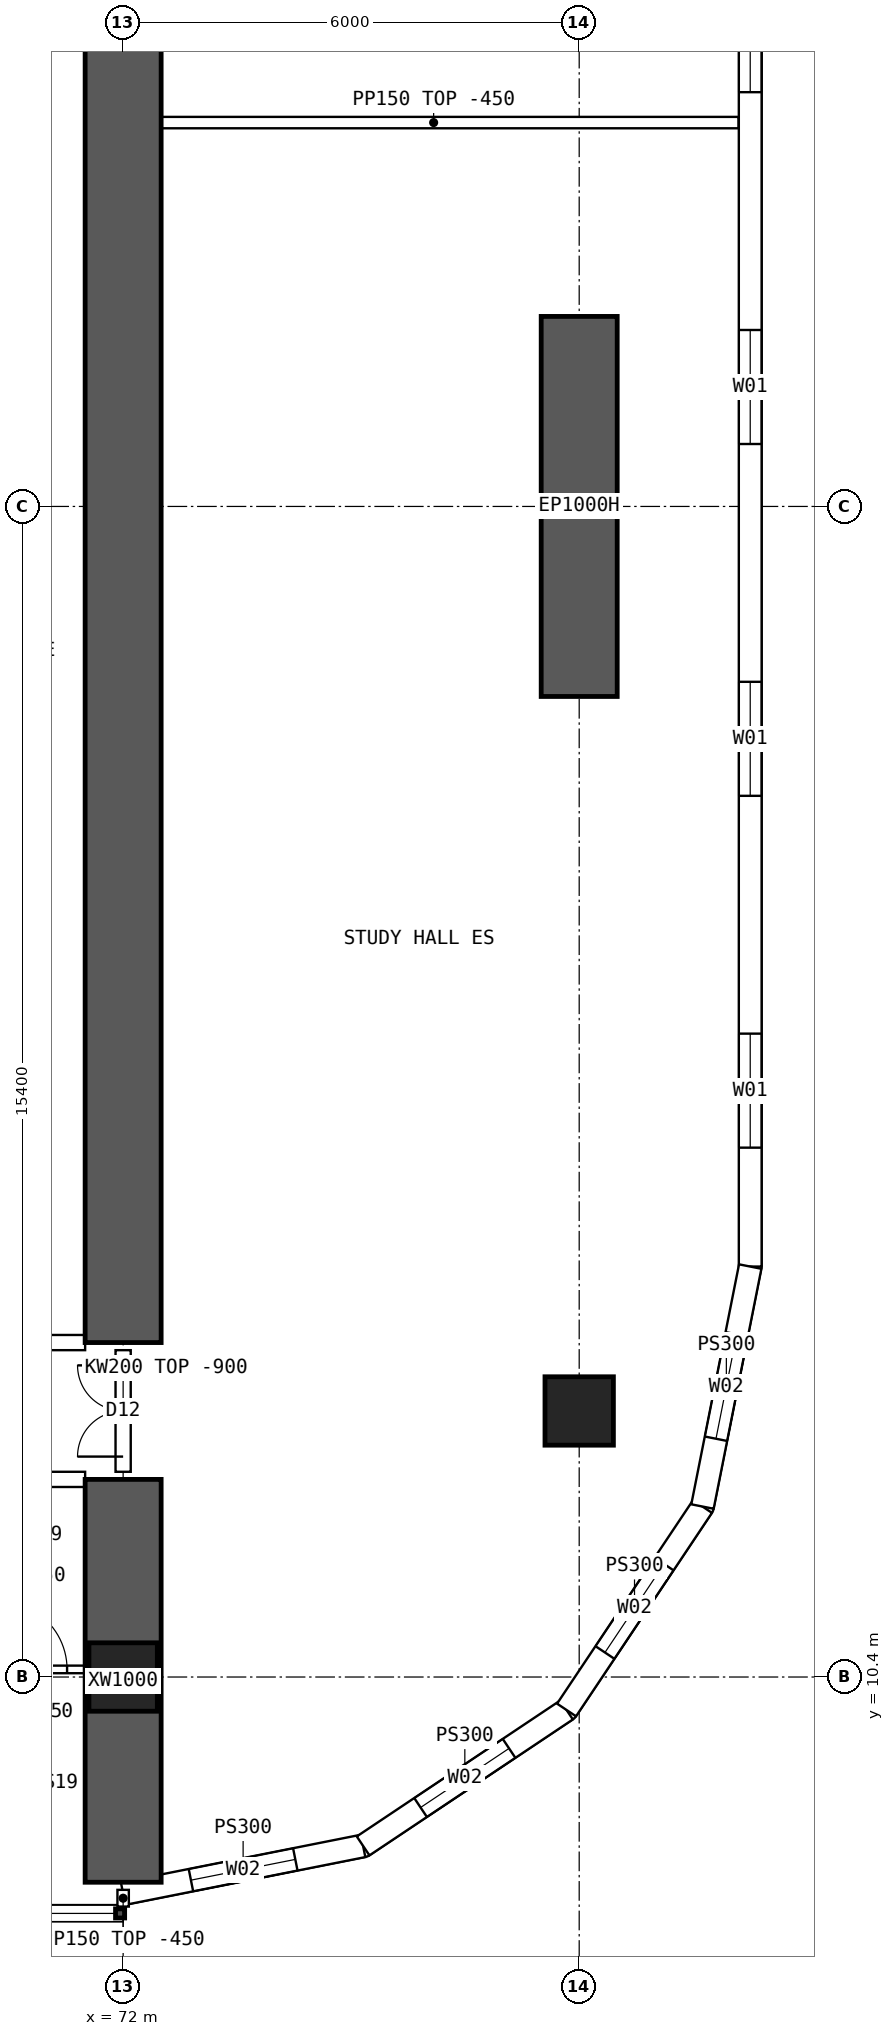
"""IFC4 building model, lengths in metres.
Left out: names, types, materials, properties, quantities, classifications, styles, units other than length and angle.
Written with IfcOpenShell. Run it as: python <this file> out.ifc"""

import sys

from ifc_helpers import new_model, si_unit, direction, frame, frame_2d, origin, origin_2d, place, context, subcontext, project, spatial, polyline, rectangle, hollow_rectangle, outline, extrude, element, fill, save


model = new_model("IFC4")
c1 = context("Model", 3, precision=1e-05, world=origin(), true_north=direction((0.0, 1.0)))
c2 = subcontext(c1, "Body", "Model", "MODEL_VIEW")
j1 = project(units=[si_unit("LENGTHUNIT", "METRE"), si_unit("PLANEANGLEUNIT", "RADIAN")], contexts=[c1])
p1 = place(None, origin())
s1 = spatial("IfcSite", under=j1, at=p1, CompositionType="ELEMENT")
p2 = place(p1, origin())
s2 = spatial("IfcBuilding", under=s1, at=p2, CompositionType="ELEMENT")
p3 = place(p2, frame((0.0, 0.0, 20.2)))
s3 = spatial("IfcBuildingStorey", under=s2, at=p3, CompositionType="ELEMENT", Elevation=20.2)
for number, where, z_axis, x_axis in (
    (1, (72.0, 10.4, 0.0), (0.0, 0.0, 1.0), (1.0, 0.0, 0.0)),
    (2, (78.0, 13.9, 0.0), (0.0, 0.0, 1.0), (1.0, 0.0, 0.0)),
):
    element("IfcColumn", number, at=place(p3, frame(where, z_axis=z_axis, x_axis=x_axis)), inside=s3, PredefinedType="COLUMN", context=c2, shape_type="SweptSolid", body=[
        extrude(hollow_rectangle(XDim=0.9, YDim=0.9, WallThickness=0.09, at=origin_2d()), origin(), (0.0, 0.0, 1.0), 3.75),
    ])
p4 = place(p3, frame((78.0, 23.3, 0.0), z_axis=(0.0, 0.0, 1.0), x_axis=(0.0, 1.0, 0.0)))
e3 = element("IfcWall", 3, at=p4, inside=s3, PredefinedType="SHEAR", context=c2, shape_type="SweptSolid", body=[
    extrude(rectangle(XDim=5.0, YDim=1.0, at=frame_2d((2.5, 0.0))), origin(), (0.0, 0.0, 1.0), 3.75),
])
p5 = place(p3, frame((72.0, 7.7, 0.0), z_axis=(0.0, 0.0, 1.0), x_axis=(0.0, 1.0, 0.0)))
e4 = element("IfcWall", 4, at=p5, inside=s3, PredefinedType="SHEAR", context=c2, shape_type="SweptSolid", body=[
    extrude(rectangle(XDim=5.3, YDim=1.0, at=frame_2d((2.65, 0.0))), origin(), (0.0, 0.0, 1.0), 3.75),
])
p6 = place(p3, frame((72.0, 14.8, 0.0), z_axis=(0.0, 0.0, 1.0), x_axis=(0.0, 1.0, 0.0)))
e5 = element("IfcWall", 5, at=p6, inside=s3, PredefinedType="SHEAR", context=c2, shape_type="SweptSolid", body=[
    extrude(rectangle(XDim=34.4, YDim=1.0, at=frame_2d((17.2, 0.0))), origin(), (0.0, 0.0, 1.0), 3.75),
])
p7 = place(p3, frame((80.25, 15.8, 0.0), z_axis=(0.0, 0.0, 1.0), x_axis=(0.0, 1.0, 0.0)))
e6 = element("IfcWall", 6, at=p7, inside=s3, PredefinedType="SOLIDWALL", context=c2, shape_type="SweptSolid", body=[
    extrude(outline(polyline([(-0.015, -0.15), (32.415, -0.15), (32.385, 0.15), (0.015, 0.15), (-0.015, -0.15)])), origin(), (0.0, 0.0, 1.0), 3.3),
])
p8 = place(p7, frame((1.564, 0.0, 0.9)))
e7 = element("IfcOpeningElement", 7, at=p8, cuts=e6, PredefinedType="OPENING", context=c2, shape_type="SweptSolid", body=[
    extrude(rectangle(XDim=1.5, YDim=2.0, at=frame_2d((0.75, 1.0))), frame((0.0, 0.16, 0.0), z_axis=(0.0, -1.0, 0.0), x_axis=(1.0, 0.0, 0.0)), (0.0, 0.0, 1.0), 0.32),
])
p9 = place(p7, frame((6.193, 0.0, 0.9)))
e8 = element("IfcOpeningElement", 8, at=p9, cuts=e6, PredefinedType="OPENING", context=c2, shape_type="SweptSolid", body=[
    extrude(rectangle(XDim=1.5, YDim=2.0, at=frame_2d((0.75, 1.0))), frame((0.0, 0.16, 0.0), z_axis=(0.0, -1.0, 0.0), x_axis=(1.0, 0.0, 0.0)), (0.0, 0.0, 1.0), 0.32),
])
p10 = place(p7, frame((10.822, 0.0, 0.9)))
e9 = element("IfcOpeningElement", 9, at=p10, cuts=e6, PredefinedType="OPENING", context=c2, shape_type="SweptSolid", body=[
    extrude(rectangle(XDim=1.5, YDim=2.0, at=frame_2d((0.75, 1.0))), frame((0.0, 0.16, 0.0), z_axis=(0.0, -1.0, 0.0), x_axis=(1.0, 0.0, 0.0)), (0.0, 0.0, 1.0), 0.32),
])
p11 = place(p7, frame((15.45, 0.0, 0.9)))
e10 = element("IfcOpeningElement", 10, at=p11, cuts=e6, PredefinedType="OPENING", context=c2, shape_type="SweptSolid", body=[
    extrude(rectangle(XDim=1.5, YDim=2.0, at=frame_2d((0.75, 1.0))), frame((0.0, 0.16, 0.0), z_axis=(0.0, -1.0, 0.0), x_axis=(1.0, 0.0, 0.0)), (0.0, 0.0, 1.0), 0.32),
])
p12 = place(p7, frame((20.079, 0.0, 0.9)))
e11 = element("IfcOpeningElement", 11, at=p12, cuts=e6, PredefinedType="OPENING", context=c2, shape_type="SweptSolid", body=[
    extrude(rectangle(XDim=1.5, YDim=2.0, at=frame_2d((0.75, 1.0))), frame((0.0, 0.16, 0.0), z_axis=(0.0, -1.0, 0.0), x_axis=(1.0, 0.0, 0.0)), (0.0, 0.0, 1.0), 0.32),
])
p13 = place(p7, frame((24.707, 0.0, 0.9)))
e12 = element("IfcOpeningElement", 12, at=p13, cuts=e6, PredefinedType="OPENING", context=c2, shape_type="SweptSolid", body=[
    extrude(rectangle(XDim=1.5, YDim=2.0, at=frame_2d((0.75, 1.0))), frame((0.0, 0.16, 0.0), z_axis=(0.0, -1.0, 0.0), x_axis=(1.0, 0.0, 0.0)), (0.0, 0.0, 1.0), 0.32),
])
p14 = place(p7, frame((29.336, 0.0, 0.9)))
e13 = element("IfcOpeningElement", 13, at=p14, cuts=e6, PredefinedType="OPENING", context=c2, shape_type="SweptSolid", body=[
    extrude(rectangle(XDim=1.5, YDim=2.0, at=frame_2d((0.75, 1.0))), frame((0.0, 0.16, 0.0), z_axis=(0.0, -1.0, 0.0), x_axis=(1.0, 0.0, 0.0)), (0.0, 0.0, 1.0), 0.32),
])
p15 = place(p3, frame((72.0, 7.55, 0.0), z_axis=(0.0, 0.0, 1.0), x_axis=(0.980787251524, 0.195080412259, 0.0)))
e14 = element("IfcWall", 14, at=p15, inside=s3, PredefinedType="SOLIDWALL", context=c2, shape_type="SweptSolid", body=[
    extrude(outline(polyline([(-0.03, -0.15), (3.249, -0.15), (3.189, 0.15), (0.03, 0.15), (-0.03, -0.15)])), origin(), (0.0, 0.0, 1.0), 3.3),
])
p16 = place(p15, frame((0.909, 0.0, 0.9)))
e15 = element("IfcOpeningElement", 15, at=p16, cuts=e14, PredefinedType="OPENING", context=c2, shape_type="SweptSolid", body=[
    extrude(rectangle(XDim=1.4, YDim=1.8, at=frame_2d((0.7, 0.9))), frame((0.0, 0.16, 0.0), z_axis=(0.0, -1.0, 0.0), x_axis=(1.0, 0.0, 0.0)), (0.0, 0.0, 1.0), 0.32),
])
p17 = place(p3, frame((75.157, 8.178, 0.0), z_axis=(0.0, 0.0, 1.0), x_axis=(0.831478105043, 0.555557522525, 0.0)))
e16 = element("IfcWall", 16, at=p17, inside=s3, PredefinedType="SOLIDWALL", context=c2, shape_type="SweptSolid", body=[
    extrude(outline(polyline([(-0.03, -0.15), (3.249, -0.15), (3.189, 0.15), (0.03, 0.15), (-0.03, -0.15)])), origin(), (0.0, 0.0, 1.0), 3.3),
])
p18 = place(p17, frame((0.909, 0.0, 0.9)))
e17 = element("IfcOpeningElement", 17, at=p18, cuts=e16, PredefinedType="OPENING", context=c2, shape_type="SweptSolid", body=[
    extrude(rectangle(XDim=1.4, YDim=1.8, at=frame_2d((0.7, 0.9))), frame((0.0, 0.16, 0.0), z_axis=(0.0, -1.0, 0.0), x_axis=(1.0, 0.0, 0.0)), (0.0, 0.0, 1.0), 0.32),
])
p19 = place(p3, frame((77.833, 9.966, 0.0), z_axis=(0.0, 0.0, 1.0), x_axis=(0.555609954424, 0.831443069936, 0.0)))
e18 = element("IfcWall", 18, at=p19, inside=s3, PredefinedType="SOLIDWALL", context=c2, shape_type="SweptSolid", body=[
    extrude(outline(polyline([(-0.03, -0.15), (3.249, -0.15), (3.189, 0.15), (0.03, 0.15), (-0.03, -0.15)])), origin(), (0.0, 0.0, 1.0), 3.3),
])
p20 = place(p19, frame((0.909, 0.0, 0.9)))
e19 = element("IfcOpeningElement", 19, at=p20, cuts=e18, PredefinedType="OPENING", context=c2, shape_type="SweptSolid", body=[
    extrude(rectangle(XDim=1.4, YDim=1.8, at=frame_2d((0.7, 0.9))), frame((0.0, 0.16, 0.0), z_axis=(0.0, -1.0, 0.0), x_axis=(1.0, 0.0, 0.0)), (0.0, 0.0, 1.0), 0.32),
])
p21 = place(p3, frame((79.622, 12.643, 0.0), z_axis=(0.0, 0.0, 1.0), x_axis=(0.195065901187, 0.980790137692, 0.0)))
e20 = element("IfcWall", 20, at=p21, inside=s3, PredefinedType="SOLIDWALL", context=c2, shape_type="SweptSolid", body=[
    extrude(outline(polyline([(-0.03, -0.15), (3.234, -0.15), (3.204, 0.15), (0.03, 0.15), (-0.03, -0.15)])), origin(), (0.0, 0.0, 1.0), 3.3),
])
p22 = place(p21, frame((0.909, 0.0, 0.9)))
e21 = element("IfcOpeningElement", 21, at=p22, cuts=e20, PredefinedType="OPENING", context=c2, shape_type="SweptSolid", body=[
    extrude(rectangle(XDim=1.4, YDim=1.8, at=frame_2d((0.7, 0.9))), frame((0.0, 0.16, 0.0), z_axis=(0.0, -1.0, 0.0), x_axis=(1.0, 0.0, 0.0)), (0.0, 0.0, 1.0), 0.32),
])
p23 = place(p3, frame((66.5, 13.0, 0.0), z_axis=(0.0, 0.0, 1.0), x_axis=(1.0, 0.0, 0.0)))
e22 = element("IfcWall", 22, at=p23, inside=s3, PredefinedType="SOLIDWALL", context=c2, shape_type="SweptSolid", body=[
    extrude(outline(polyline([(0.0, 0.0), (5.0, 0.0), (5.0, 2.9), (0.0, 2.9), (0.0, 0.0)])), frame((0.0, 0.1, 0.0), z_axis=(0.0, -1.0, 0.0), x_axis=(1.0, 0.0, 0.0)), (0.0, 0.0, 1.0), 0.2),
])
p24 = place(p23, frame((1.425, 0.0, 0.0)))
e23 = element("IfcOpeningElement", 23, at=p24, cuts=e22, PredefinedType="OPENING", context=c2, shape_type="SweptSolid", body=[
    extrude(rectangle(XDim=0.9, YDim=2.1, at=frame_2d((0.45, 1.05))), frame((0.0, 0.11, 0.0), z_axis=(0.0, -1.0, 0.0), x_axis=(1.0, 0.0, 0.0)), (0.0, 0.0, 1.0), 0.22),
])
p25 = place(p23, frame((2.675, 0.0, 0.0)))
e24 = element("IfcOpeningElement", 24, at=p25, cuts=e22, PredefinedType="OPENING", context=c2, shape_type="SweptSolid", body=[
    extrude(rectangle(XDim=0.9, YDim=2.1, at=frame_2d((0.45, 1.05))), frame((0.0, 0.11, 0.0), z_axis=(0.0, -1.0, 0.0), x_axis=(1.0, 0.0, 0.0)), (0.0, 0.0, 1.0), 0.22),
])
p26 = place(p3, frame((66.5, 14.8, 0.0), z_axis=(0.0, 0.0, 1.0), x_axis=(1.0, 0.0, 0.0)))
e25 = element("IfcWall", 25, at=p26, inside=s3, PredefinedType="SOLIDWALL", context=c2, shape_type="SweptSolid", body=[
    extrude(rectangle(XDim=5.0, YDim=0.2, at=frame_2d((2.5, 0.0))), origin(), (0.0, 0.0, 1.0), 3.3),
])
p27 = place(p26, frame((0.2, 0.0, 0.0)))
e26 = element("IfcOpeningElement", 26, at=p27, cuts=e25, PredefinedType="OPENING", context=c2, shape_type="SweptSolid", body=[
    extrude(rectangle(XDim=1.6, YDim=2.1, at=frame_2d((0.8, 1.05))), frame((0.0, 0.11, 0.0), z_axis=(0.0, -1.0, 0.0), x_axis=(1.0, 0.0, 0.0)), (0.0, 0.0, 1.0), 0.22),
])
p28 = place(p3, frame((71.55, 10.5, 0.0), z_axis=(0.0, 0.0, 1.0), x_axis=(-1.0, 0.0, 0.0)))
e27 = element("IfcWall", 27, at=p28, inside=s3, PredefinedType="PARTITIONING", context=c2, shape_type="SweptSolid", body=[
    extrude(outline(polyline([(0.0, 0.0), (1.425, 0.0), (1.425, 2.9), (0.0, 2.9), (0.0, 0.0)])), frame((0.0, 0.05, 0.0), z_axis=(0.0, -1.0, 0.0), x_axis=(1.0, 0.0, 0.0)), (0.0, 0.0, 1.0), 0.1),
])
p29 = place(p28, frame((0.288, 0.0, 0.0)))
e28 = element("IfcOpeningElement", 28, at=p29, cuts=e27, PredefinedType="OPENING", context=c2, shape_type="SweptSolid", body=[
    extrude(rectangle(XDim=0.9, YDim=2.1, at=frame_2d((0.45, 1.05))), frame((0.0, 0.06, 0.0), z_axis=(0.0, -1.0, 0.0), x_axis=(1.0, 0.0, 0.0)), (0.0, 0.0, 1.0), 0.12),
])
p30 = place(p3, frame((72.075, 30.85, 0.0), z_axis=(0.0, 0.0, 1.0), x_axis=(1.0, 0.0, 0.0)))
e29 = element("IfcWall", 29, at=p30, inside=s3, PredefinedType="PARTITIONING", context=c2, shape_type="SweptSolid", body=[
    extrude(outline(polyline([(0.0, 0.0), (8.02, 0.0), (8.02, 3.3), (6.227, 3.3), (6.225, 2.85), (5.627, 2.85), (5.625, 3.3), (0.0, 3.3), (0.0, 0.0)])), frame((0.0, 0.075, 0.0), z_axis=(0.0, -1.0, 0.0), x_axis=(1.0, 0.0, 0.0)), (0.0, 0.0, 1.0), 0.15),
])
p31 = place(p3, frame((72.0, 13.1, 0.0), z_axis=(0.0, 0.0, 1.0), x_axis=(0.0, 1.0, 0.0)))
e30 = element("IfcWall", 30, at=p31, inside=s3, PredefinedType="SOLIDWALL", context=c2, shape_type="SweptSolid", body=[
    extrude(outline(polyline([(0.0, 0.0), (1.6, 0.0), (1.6, 2.85), (0.0, 2.85), (0.0, 0.0)])), frame((0.0, 0.1, 0.0), z_axis=(0.0, -1.0, 0.0), x_axis=(1.0, 0.0, 0.0)), (0.0, 0.0, 1.0), 0.2),
])
p32 = place(p31, frame((0.2, 0.0, 0.0)))
e31 = element("IfcOpeningElement", 31, at=p32, cuts=e30, PredefinedType="OPENING", context=c2, shape_type="SweptSolid", body=[
    extrude(rectangle(XDim=1.2, YDim=2.1, at=frame_2d((0.6, 1.05))), frame((0.0, 0.11, 0.0), z_axis=(0.0, -1.0, 0.0), x_axis=(1.0, 0.0, 0.0)), (0.0, 0.0, 1.0), 0.22),
])
p33 = place(p3, frame((72.0, 7.6, 0.0), z_axis=(0.0, 0.0, 1.0), x_axis=(0.0, -1.0, 0.0)))
e32 = element("IfcWall", 32, at=p33, inside=s3, PredefinedType="PARTITIONING", context=c2, shape_type="SweptSolid", body=[
    extrude(rectangle(XDim=0.22, YDim=0.15, at=frame_2d((0.11, 0.0))), origin(), (0.0, 0.0, 1.0), 3.3),
])
p34 = place(p8, origin())
e33 = element("IfcWindow", 33, at=p34, inside=s3, PartitioningType="SINGLE_PANEL", PredefinedType="WINDOW", context=c2, shape_type="SweptSolid", body=[
    extrude(rectangle(XDim=1.5, YDim=2.0, at=frame_2d((0.75, 1.0))), frame((0.0, 0.03, 0.0), z_axis=(0.0, -1.0, 0.0), x_axis=(1.0, 0.0, 0.0)), (0.0, 0.0, 1.0), 0.06),
])
fill(e7, e33)
p35 = place(p9, origin())
e34 = element("IfcWindow", 34, at=p35, inside=s3, PartitioningType="SINGLE_PANEL", PredefinedType="WINDOW", context=c2, shape_type="SweptSolid", body=[
    extrude(rectangle(XDim=1.5, YDim=2.0, at=frame_2d((0.75, 1.0))), frame((0.0, 0.03, 0.0), z_axis=(0.0, -1.0, 0.0), x_axis=(1.0, 0.0, 0.0)), (0.0, 0.0, 1.0), 0.06),
])
fill(e8, e34)
p36 = place(p10, origin())
e35 = element("IfcWindow", 35, at=p36, inside=s3, PartitioningType="SINGLE_PANEL", PredefinedType="WINDOW", context=c2, shape_type="SweptSolid", body=[
    extrude(rectangle(XDim=1.5, YDim=2.0, at=frame_2d((0.75, 1.0))), frame((0.0, 0.03, 0.0), z_axis=(0.0, -1.0, 0.0), x_axis=(1.0, 0.0, 0.0)), (0.0, 0.0, 1.0), 0.06),
])
fill(e9, e35)
p37 = place(p11, origin())
e36 = element("IfcWindow", 36, at=p37, inside=s3, PartitioningType="SINGLE_PANEL", PredefinedType="WINDOW", context=c2, shape_type="SweptSolid", body=[
    extrude(rectangle(XDim=1.5, YDim=2.0, at=frame_2d((0.75, 1.0))), frame((0.0, 0.03, 0.0), z_axis=(0.0, -1.0, 0.0), x_axis=(1.0, 0.0, 0.0)), (0.0, 0.0, 1.0), 0.06),
])
fill(e10, e36)
p38 = place(p16, origin())
e37 = element("IfcWindow", 37, at=p38, inside=s3, PartitioningType="SINGLE_PANEL", PredefinedType="WINDOW", context=c2, shape_type="SweptSolid", body=[
    extrude(rectangle(XDim=1.4, YDim=1.8, at=frame_2d((0.7, 0.9))), frame((0.0, 0.03, 0.0), z_axis=(0.0, -1.0, 0.0), x_axis=(1.0, 0.0, 0.0)), (0.0, 0.0, 1.0), 0.06),
])
fill(e15, e37)
p39 = place(p18, origin())
e38 = element("IfcWindow", 38, at=p39, inside=s3, PartitioningType="SINGLE_PANEL", PredefinedType="WINDOW", context=c2, shape_type="SweptSolid", body=[
    extrude(rectangle(XDim=1.4, YDim=1.8, at=frame_2d((0.7, 0.9))), frame((0.0, 0.03, 0.0), z_axis=(0.0, -1.0, 0.0), x_axis=(1.0, 0.0, 0.0)), (0.0, 0.0, 1.0), 0.06),
])
fill(e17, e38)
p40 = place(p20, origin())
e39 = element("IfcWindow", 39, at=p40, inside=s3, PartitioningType="SINGLE_PANEL", PredefinedType="WINDOW", context=c2, shape_type="SweptSolid", body=[
    extrude(rectangle(XDim=1.4, YDim=1.8, at=frame_2d((0.7, 0.9))), frame((0.0, 0.03, 0.0), z_axis=(0.0, -1.0, 0.0), x_axis=(1.0, 0.0, 0.0)), (0.0, 0.0, 1.0), 0.06),
])
fill(e19, e39)
p41 = place(p22, origin())
e40 = element("IfcWindow", 40, at=p41, inside=s3, PartitioningType="SINGLE_PANEL", PredefinedType="WINDOW", context=c2, shape_type="SweptSolid", body=[
    extrude(rectangle(XDim=1.4, YDim=1.8, at=frame_2d((0.7, 0.9))), frame((0.0, 0.03, 0.0), z_axis=(0.0, -1.0, 0.0), x_axis=(1.0, 0.0, 0.0)), (0.0, 0.0, 1.0), 0.06),
])
fill(e21, e40)
p42 = place(p29, origin())
e41 = element("IfcDoor", 41, at=p42, inside=s3, OperationType="SINGLE_SWING_RIGHT", PredefinedType="DOOR", context=c2, shape_type="SweptSolid", body=[
    extrude(rectangle(XDim=0.9, YDim=2.1, at=frame_2d((0.45, 1.05))), frame((0.0, 0.025, 0.0), z_axis=(0.0, -1.0, 0.0), x_axis=(1.0, 0.0, 0.0)), (0.0, 0.0, 1.0), 0.05),
])
fill(e28, e41)
p43 = place(p32, origin())
e42 = element("IfcDoor", 42, at=p43, inside=s3, OperationType="DOUBLE_DOOR_SINGLE_SWING", PredefinedType="DOOR", context=c2, shape_type="SweptSolid", body=[
    extrude(rectangle(XDim=1.2, YDim=2.1, at=frame_2d((0.6, 1.05))), frame((0.0, 0.025, 0.0), z_axis=(0.0, -1.0, 0.0), x_axis=(1.0, 0.0, 0.0)), (0.0, 0.0, 1.0), 0.05),
])
fill(e31, e42)
save(model, sys.argv[1])
